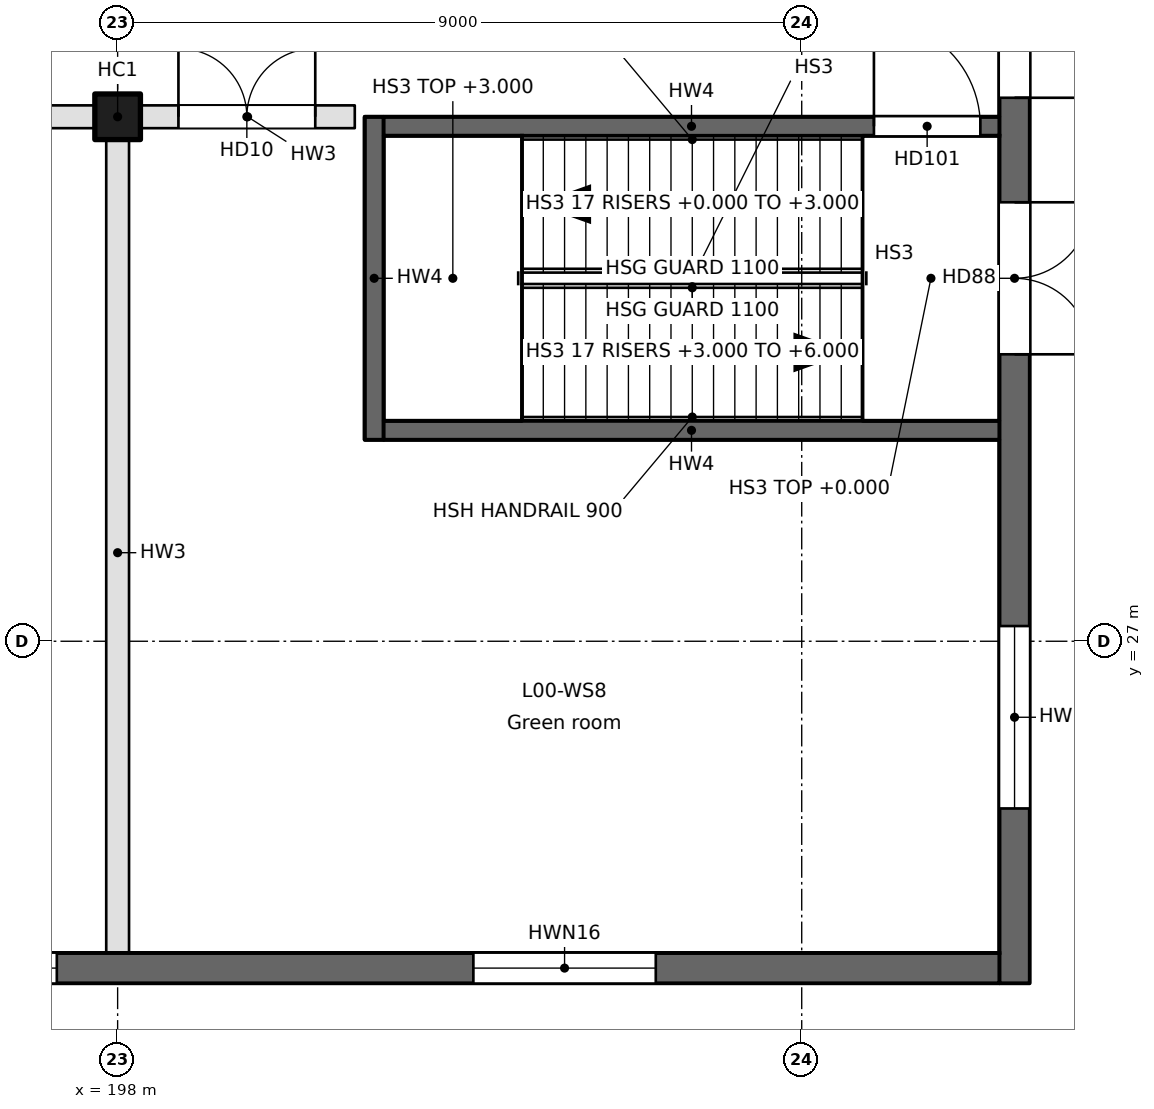
"""IFC4 building model, lengths in metres.
Left out: names, types, materials, properties, quantities, classifications, styles, units other than length and angle.
Written with IfcOpenShell. Run it as: python <this file> out.ifc"""

import sys

from ifc_helpers import new_model, si_unit, direction, frame, frame_2d, origin, origin_2d, place, context, subcontext, project, spatial, rectangle, extrude, element, fill, save


model = new_model("IFC4")
c1 = context("Model", 3, precision=1e-05, world=origin(), true_north=direction((0.0, 1.0)))
c2 = subcontext(c1, "Body", "Model", "MODEL_VIEW")
j1 = project(units=[si_unit("LENGTHUNIT", "METRE"), si_unit("PLANEANGLEUNIT", "RADIAN")], contexts=[c1])
p1 = place(None, origin())
s1 = spatial("IfcSite", under=j1, at=p1, CompositionType="ELEMENT")
p2 = place(p1, origin())
s2 = spatial("IfcBuilding", under=s1, at=p2, CompositionType="ELEMENT")
p3 = place(p2, origin())
s3 = spatial("IfcBuildingStorey", under=s2, at=p3, CompositionType="ELEMENT", Elevation=0.0)
p4 = place(p3, frame((198.0, 33.9, -1.8), z_axis=(0.0, 0.0, 1.0), x_axis=(1.0, 0.0, 0.0)))
e1 = element("IfcColumn", 1, at=p4, inside=s3, PredefinedType="COLUMN", context=c2, shape_type="SweptSolid", body=[
    extrude(rectangle(XDim=0.6, YDim=0.6, at=origin_2d()), origin(), (0.0, 0.0, 1.0), 7.8),
])
p5 = place(p3, frame((209.8, 76.5, -1.8), z_axis=(0.0, 0.0, 1.0), x_axis=(0.0, -1.0, 0.0)))
e2 = element("IfcWall", 2, at=p5, inside=s3, PredefinedType="SOLIDWALL", context=c2, shape_type="SweptSolid", body=[
    extrude(rectangle(XDim=54.0, YDim=0.4, at=frame_2d((27.0, 0.0))), origin(), (0.0, 0.0, 1.0), 7.45),
])
p6 = place(p5, frame((43.725, 0.0, 1.8)))
e3 = element("IfcOpeningElement", 3, at=p6, cuts=e2, PredefinedType="OPENING", context=c2, shape_type="SweptSolid", body=[
    extrude(rectangle(XDim=2.0, YDim=2.1, at=frame_2d((1.0, 1.05))), frame((0.0, 0.2, 0.0), z_axis=(0.0, -1.0, 0.0), x_axis=(1.0, 0.0, 0.0)), (0.0, 0.0, 1.0), 0.4),
])
p7 = place(p5, frame((8.275, 0.0, 1.8)))
e4 = element("IfcOpeningElement", 4, at=p7, cuts=e2, PredefinedType="OPENING", context=c2, shape_type="SweptSolid", body=[
    extrude(rectangle(XDim=2.0, YDim=2.1, at=frame_2d((1.0, 1.05))), frame((0.0, 0.2, 0.0), z_axis=(0.0, -1.0, 0.0), x_axis=(1.0, 0.0, 0.0)), (0.0, 0.0, 1.0), 0.4),
])
p8 = place(p5, frame((40.35, 0.0, 1.8)))
e5 = element("IfcOpeningElement", 5, at=p8, cuts=e2, PredefinedType="OPENING", context=c2, shape_type="SweptSolid", body=[
    extrude(rectangle(XDim=2.0, YDim=2.1, at=frame_2d((1.0, 1.05))), frame((0.0, 0.2, 0.0), z_axis=(0.0, -1.0, 0.0), x_axis=(1.0, 0.0, 0.0)), (0.0, 0.0, 1.0), 0.4),
])
p9 = place(p5, frame((11.65, 0.0, 1.8)))
e6 = element("IfcOpeningElement", 6, at=p9, cuts=e2, PredefinedType="OPENING", context=c2, shape_type="SweptSolid", body=[
    extrude(rectangle(XDim=2.0, YDim=2.1, at=frame_2d((1.0, 1.05))), frame((0.0, 0.2, 0.0), z_axis=(0.0, -1.0, 0.0), x_axis=(1.0, 0.0, 0.0)), (0.0, 0.0, 1.0), 0.4),
])
p10 = place(p5, frame((24.9, 0.0, 1.8)))
e7 = element("IfcOpeningElement", 7, at=p10, cuts=e2, PredefinedType="OPENING", context=c2, shape_type="SweptSolid", body=[
    extrude(rectangle(XDim=4.2, YDim=4.2, at=frame_2d((2.1, 2.1))), frame((0.0, 0.2, 0.0), z_axis=(0.0, -1.0, 0.0), x_axis=(1.0, 0.0, 0.0)), (0.0, 0.0, 1.0), 0.4),
])
p11 = place(p5, frame((49.3, 0.0, 2.7)))
e8 = element("IfcOpeningElement", 8, at=p11, cuts=e2, PredefinedType="OPENING", context=c2, shape_type="SweptSolid", body=[
    extrude(rectangle(XDim=2.4, YDim=1.8, at=frame_2d((1.2, 0.9))), frame((0.0, 0.2, 0.0), z_axis=(0.0, -1.0, 0.0), x_axis=(1.0, 0.0, 0.0)), (0.0, 0.0, 1.0), 0.4),
])
p12 = place(p5, frame((2.3, 0.0, 2.7)))
e9 = element("IfcOpeningElement", 9, at=p12, cuts=e2, PredefinedType="OPENING", context=c2, shape_type="SweptSolid", body=[
    extrude(rectangle(XDim=2.4, YDim=1.8, at=frame_2d((1.2, 0.9))), frame((0.0, 0.2, 0.0), z_axis=(0.0, -1.0, 0.0), x_axis=(1.0, 0.0, 0.0)), (0.0, 0.0, 1.0), 0.4),
])
p13 = place(p3, frame((209.6, 22.7, -1.8), z_axis=(0.0, 0.0, 1.0), x_axis=(-1.0, 0.0, 0.0)))
e10 = element("IfcWall", 10, at=p13, inside=s3, PredefinedType="SOLIDWALL", context=c2, shape_type="SweptSolid", body=[
    extrude(rectangle(XDim=59.2, YDim=0.4, at=frame_2d((29.6, 0.0))), origin(), (0.0, 0.0, 1.0), 7.45),
])
p14 = place(p13, frame((56.325, 0.0, 1.8)))
e11 = element("IfcOpeningElement", 11, at=p14, cuts=e10, PredefinedType="OPENING", context=c2, shape_type="SweptSolid", body=[
    extrude(rectangle(XDim=2.0, YDim=2.1, at=frame_2d((1.0, 1.05))), frame((0.0, 0.2, 0.0), z_axis=(0.0, -1.0, 0.0), x_axis=(1.0, 0.0, 0.0)), (0.0, 0.0, 1.0), 0.4),
])
p15 = place(p13, frame((48.7, 0.0, 2.7)))
e12 = element("IfcOpeningElement", 12, at=p15, cuts=e10, PredefinedType="OPENING", context=c2, shape_type="SweptSolid", body=[
    extrude(rectangle(XDim=2.4, YDim=1.8, at=frame_2d((1.2, 0.9))), frame((0.0, 0.2, 0.0), z_axis=(0.0, -1.0, 0.0), x_axis=(1.0, 0.0, 0.0)), (0.0, 0.0, 1.0), 0.4),
])
p16 = place(p13, frame((42.4, 0.0, 2.7)))
e13 = element("IfcOpeningElement", 13, at=p16, cuts=e10, PredefinedType="OPENING", context=c2, shape_type="SweptSolid", body=[
    extrude(rectangle(XDim=2.4, YDim=1.8, at=frame_2d((1.2, 0.9))), frame((0.0, 0.2, 0.0), z_axis=(0.0, -1.0, 0.0), x_axis=(1.0, 0.0, 0.0)), (0.0, 0.0, 1.0), 0.4),
])
p17 = place(p13, frame((18.15, 0.0, 2.7)))
e14 = element("IfcOpeningElement", 14, at=p17, cuts=e10, PredefinedType="OPENING", context=c2, shape_type="SweptSolid", body=[
    extrude(rectangle(XDim=2.4, YDim=1.8, at=frame_2d((1.2, 0.9))), frame((0.0, 0.2, 0.0), z_axis=(0.0, -1.0, 0.0), x_axis=(1.0, 0.0, 0.0)), (0.0, 0.0, 1.0), 0.4),
])
p18 = place(p13, frame((12.4, 0.0, 2.7)))
e15 = element("IfcOpeningElement", 15, at=p18, cuts=e10, PredefinedType="OPENING", context=c2, shape_type="SweptSolid", body=[
    extrude(rectangle(XDim=2.4, YDim=1.8, at=frame_2d((1.2, 0.9))), frame((0.0, 0.2, 0.0), z_axis=(0.0, -1.0, 0.0), x_axis=(1.0, 0.0, 0.0)), (0.0, 0.0, 1.0), 0.4),
])
p19 = place(p13, frame((4.52, 0.0, 2.7)))
e16 = element("IfcOpeningElement", 16, at=p19, cuts=e10, PredefinedType="OPENING", context=c2, shape_type="SweptSolid", body=[
    extrude(rectangle(XDim=2.4, YDim=1.8, at=frame_2d((1.2, 0.9))), frame((0.0, 0.2, 0.0), z_axis=(0.0, -1.0, 0.0), x_axis=(1.0, 0.0, 0.0)), (0.0, 0.0, 1.0), 0.4),
])
p20 = place(p3, frame((189.3, 33.9, 0.0), z_axis=(0.0, 0.0, 1.0), x_axis=(1.0, 0.0, 0.0)))
e17 = element("IfcWall", 17, at=p20, inside=s3, PredefinedType="PARTITIONING", context=c2, shape_type="SweptSolid", body=[
    extrude(rectangle(XDim=8.4, YDim=0.3, at=frame_2d((4.2, 0.0))), origin(), (0.0, 0.0, 1.0), 5.65),
])
p21 = place(p20, frame((1.5, 0.0, 0.0)))
e18 = element("IfcOpeningElement", 18, at=p21, cuts=e17, PredefinedType="OPENING", context=c2, shape_type="SweptSolid", body=[
    extrude(rectangle(XDim=1.8, YDim=2.1, at=frame_2d((0.9, 1.05))), frame((0.0, 0.15, 0.0), z_axis=(0.0, -1.0, 0.0), x_axis=(1.0, 0.0, 0.0)), (0.0, 0.0, 1.0), 0.3),
])
p22 = place(p20, frame((5.93, 0.0, 0.0)))
e19 = element("IfcOpeningElement", 19, at=p22, cuts=e17, PredefinedType="OPENING", context=c2, shape_type="SweptSolid", body=[
    extrude(rectangle(XDim=1.0, YDim=2.1, at=frame_2d((0.5, 1.05))), frame((0.0, 0.15, 0.0), z_axis=(0.0, -1.0, 0.0), x_axis=(1.0, 0.0, 0.0)), (0.0, 0.0, 1.0), 0.3),
])
p23 = place(p3, frame((198.3, 33.9, 0.0), z_axis=(0.0, 0.0, 1.0), x_axis=(1.0, 0.0, 0.0)))
e20 = element("IfcWall", 20, at=p23, inside=s3, PredefinedType="PARTITIONING", context=c2, shape_type="SweptSolid", body=[
    extrude(rectangle(XDim=2.82, YDim=0.3, at=frame_2d((1.41, 0.0))), origin(), (0.0, 0.0, 1.0), 5.65),
])
p24 = place(p23, frame((0.5, 0.0, 0.0)))
e21 = element("IfcOpeningElement", 21, at=p24, cuts=e20, PredefinedType="OPENING", context=c2, shape_type="SweptSolid", body=[
    extrude(rectangle(XDim=1.8, YDim=2.1, at=frame_2d((0.9, 1.05))), frame((0.0, 0.15, 0.0), z_axis=(0.0, -1.0, 0.0), x_axis=(1.0, 0.0, 0.0)), (0.0, 0.0, 1.0), 0.3),
])
p25 = place(p3, frame((198.0, 22.73, 0.0), z_axis=(0.0, 0.0, 1.0), x_axis=(0.0, 1.0, 0.0)))
e22 = element("IfcWall", 22, at=p25, inside=s3, PredefinedType="PARTITIONING", context=c2, shape_type="SweptSolid", body=[
    extrude(rectangle(XDim=10.87, YDim=0.3, at=frame_2d((5.435, 0.0))), origin(), (0.0, 0.0, 1.0), 5.65),
])
p26 = place(p3, frame((201.375, 29.65, -1.8), z_axis=(0.0, 0.0, 1.0), x_axis=(0.0, 1.0, 0.0)))
e23 = element("IfcWall", 23, at=p26, inside=s3, PredefinedType="SOLIDWALL", context=c2, shape_type="SweptSolid", body=[
    extrude(rectangle(XDim=4.25, YDim=0.25, at=frame_2d((2.125, 0.0))), origin(), (0.0, 0.0, 1.0), 7.45),
])
p27 = place(p3, frame((209.6, 29.775, -1.8), z_axis=(0.0, 0.0, 1.0), x_axis=(-1.0, 0.0, 0.0)))
e24 = element("IfcWall", 24, at=p27, inside=s3, PredefinedType="SOLIDWALL", context=c2, shape_type="SweptSolid", body=[
    extrude(rectangle(XDim=8.1, YDim=0.25, at=frame_2d((4.05, 0.0))), origin(), (0.0, 0.0, 1.0), 7.45),
])
p28 = place(p3, frame((201.5, 33.775, -1.8), z_axis=(0.0, 0.0, 1.0), x_axis=(1.0, 0.0, 0.0)))
e25 = element("IfcWall", 25, at=p28, inside=s3, PredefinedType="SOLIDWALL", context=c2, shape_type="SweptSolid", body=[
    extrude(rectangle(XDim=8.1, YDim=0.25, at=frame_2d((4.05, 0.0))), origin(), (0.0, 0.0, 1.0), 7.45),
])
p29 = place(p28, frame((6.45, 0.0, 1.8)))
e26 = element("IfcOpeningElement", 26, at=p29, cuts=e25, PredefinedType="OPENING", context=c2, shape_type="SweptSolid", body=[
    extrude(rectangle(XDim=1.4, YDim=2.1, at=frame_2d((0.7, 1.05))), frame((0.0, 0.125, 0.0), z_axis=(0.0, -1.0, 0.0), x_axis=(1.0, 0.0, 0.0)), (0.0, 0.0, 1.0), 0.25),
])
p30 = place(p24, origin())
e27 = element("IfcDoor", 27, at=p30, inside=s3, OperationType="DOUBLE_DOOR_SINGLE_SWING", PredefinedType="DOOR", context=c2, shape_type="SweptSolid", body=[
    extrude(rectangle(XDim=1.8, YDim=2.1, at=frame_2d((0.9, 1.05))), frame((0.0, 0.025, 0.0), z_axis=(0.0, -1.0, 0.0), x_axis=(1.0, 0.0, 0.0)), (0.0, 0.0, 1.0), 0.05),
])
fill(e21, e27)
p31 = place(p6, origin())
e28 = element("IfcDoor", 28, at=p31, inside=s3, OperationType="DOUBLE_DOOR_SINGLE_SWING", PredefinedType="DOOR", context=c2, shape_type="SweptSolid", body=[
    extrude(rectangle(XDim=2.0, YDim=2.1, at=frame_2d((1.0, 1.05))), frame((0.0, 0.025, 0.0), z_axis=(0.0, -1.0, 0.0), x_axis=(1.0, 0.0, 0.0)), (0.0, 0.0, 1.0), 0.05),
])
fill(e3, e28)
p32 = place(p8, origin())
e29 = element("IfcDoor", 29, at=p32, inside=s3, OperationType="DOUBLE_DOOR_SINGLE_SWING", PredefinedType="DOOR", context=c2, shape_type="SweptSolid", body=[
    extrude(rectangle(XDim=2.0, YDim=2.1, at=frame_2d((1.0, 1.05))), frame((0.0, 0.025, 0.0), z_axis=(0.0, -1.0, 0.0), x_axis=(1.0, 0.0, 0.0)), (0.0, 0.0, 1.0), 0.05),
])
fill(e5, e29)
p33 = place(p11, origin())
e30 = element("IfcWindow", 30, at=p33, inside=s3, PartitioningType="SINGLE_PANEL", PredefinedType="WINDOW", context=c2, shape_type="SweptSolid", body=[
    extrude(rectangle(XDim=2.4, YDim=1.8, at=frame_2d((1.2, 0.9))), frame((0.0, 0.03, 0.0), z_axis=(0.0, -1.0, 0.0), x_axis=(1.0, 0.0, 0.0)), (0.0, 0.0, 1.0), 0.06),
])
fill(e8, e30)
p34 = place(p18, origin())
e31 = element("IfcWindow", 31, at=p34, inside=s3, PartitioningType="SINGLE_PANEL", PredefinedType="WINDOW", context=c2, shape_type="SweptSolid", body=[
    extrude(rectangle(XDim=2.4, YDim=1.8, at=frame_2d((1.2, 0.9))), frame((0.0, 0.03, 0.0), z_axis=(0.0, -1.0, 0.0), x_axis=(1.0, 0.0, 0.0)), (0.0, 0.0, 1.0), 0.06),
])
fill(e15, e31)
p35 = place(p19, origin())
e32 = element("IfcWindow", 32, at=p35, inside=s3, PartitioningType="SINGLE_PANEL", PredefinedType="WINDOW", context=c2, shape_type="SweptSolid", body=[
    extrude(rectangle(XDim=2.4, YDim=1.8, at=frame_2d((1.2, 0.9))), frame((0.0, 0.03, 0.0), z_axis=(0.0, -1.0, 0.0), x_axis=(1.0, 0.0, 0.0)), (0.0, 0.0, 1.0), 0.06),
])
fill(e16, e32)
p36 = place(p29, origin())
e33 = element("IfcDoor", 33, at=p36, inside=s3, OperationType="SINGLE_SWING_LEFT", PredefinedType="DOOR", context=c2, shape_type="SweptSolid", body=[
    extrude(rectangle(XDim=1.4, YDim=2.1, at=frame_2d((0.7, 1.05))), frame((0.0, 0.025, 0.0), z_axis=(0.0, -1.0, 0.0), x_axis=(1.0, 0.0, 0.0)), (0.0, 0.0, 1.0), 0.05),
])
fill(e26, e33)
save(model, sys.argv[1])
